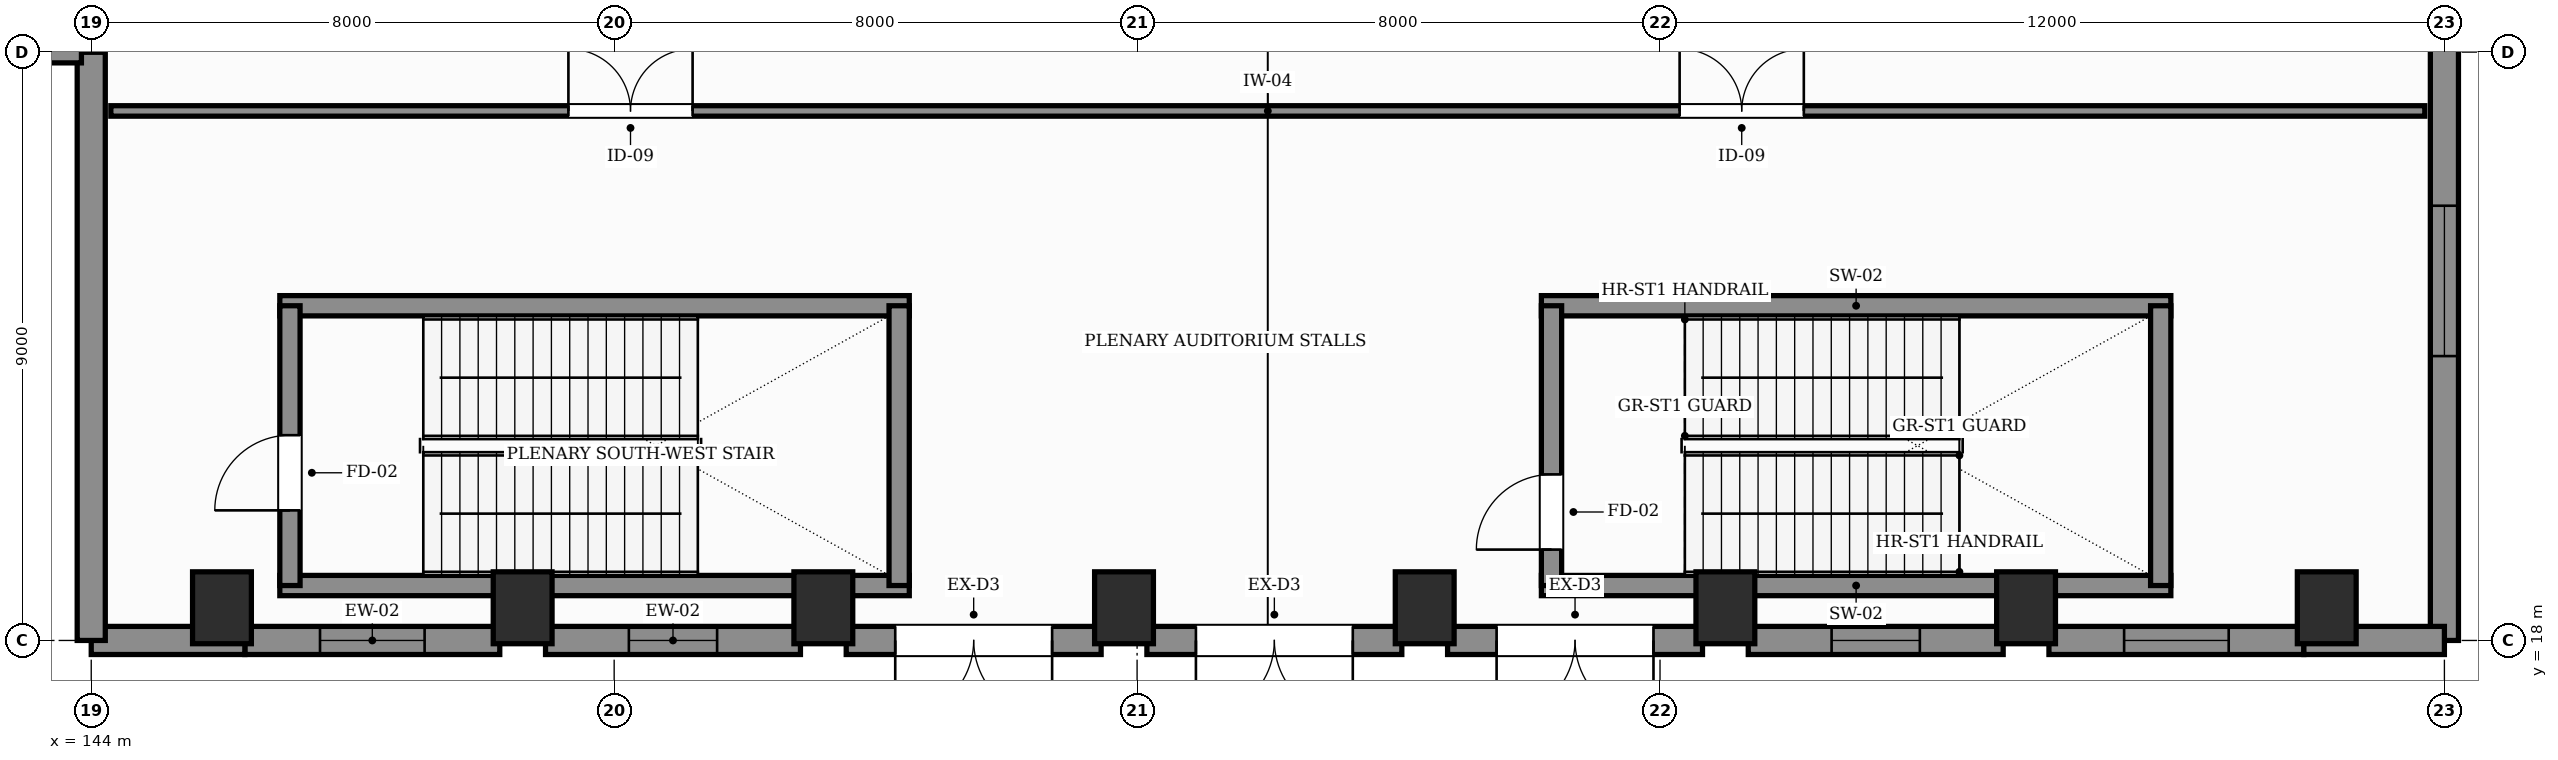
"""IFC4 building model, lengths in metres.
Left out: names, types, materials, properties, quantities, classifications, styles, units other than length and angle.
Written with IfcOpenShell. Run it as: python <this file> out.ifc"""

import sys

from ifc_helpers import new_model, si_unit, direction, frame, frame_2d, origin, origin_2d, place, context, subcontext, project, spatial, rectangle, extrude, element, fill, save


model = new_model("IFC4")
c1 = context("Model", 3, precision=1e-05, world=origin(), true_north=direction((0.0, 1.0)))
c2 = subcontext(c1, "Body", "Model", "MODEL_VIEW")
j1 = project(units=[si_unit("LENGTHUNIT", "METRE"), si_unit("PLANEANGLEUNIT", "RADIAN")], contexts=[c1])
p1 = place(None, origin())
s1 = spatial("IfcSite", under=j1, at=p1, CompositionType="ELEMENT")
p2 = place(p1, origin())
s2 = spatial("IfcBuilding", under=s1, at=p2, CompositionType="ELEMENT")
p3 = place(p2, origin())
s3 = spatial("IfcBuildingStorey", under=s2, at=p3, CompositionType="ELEMENT", Elevation=0.0)
for number, where, z_axis, x_axis in (
    (1, (146.0, 18.5, 0.0), (0.0, 0.0, 1.0), (1.0, 0.0, 0.0)),
    (2, (150.6, 18.5, 0.0), (0.0, 0.0, 1.0), (1.0, 0.0, 0.0)),
    (3, (155.2, 18.5, 0.0), (0.0, 0.0, 1.0), (1.0, 0.0, 0.0)),
    (4, (159.8, 18.5, 0.0), (0.0, 0.0, 1.0), (1.0, 0.0, 0.0)),
    (5, (164.4, 18.5, 0.0), (0.0, 0.0, 1.0), (1.0, 0.0, 0.0)),
    (6, (169.0, 18.5, 0.0), (0.0, 0.0, 1.0), (1.0, 0.0, 0.0)),
    (7, (173.6, 18.5, 0.0), (0.0, 0.0, 1.0), (1.0, 0.0, 0.0)),
    (8, (178.2, 18.5, 0.0), (0.0, 0.0, 1.0), (1.0, 0.0, 0.0)),
):
    element("IfcColumn", number, at=place(p3, frame(where, z_axis=z_axis, x_axis=x_axis)), inside=s3, PredefinedType="COLUMN", context=c2, shape_type="SweptSolid", body=[
        extrude(rectangle(XDim=0.9, YDim=1.1, at=origin_2d()), origin(), (0.0, 0.0, 1.0), 6.0),
    ])
p4 = place(p3, frame((146.35, 18.0, 0.0), z_axis=(0.0, 0.0, 1.0), x_axis=(1.0, 0.0, 0.0)))
e9 = element("IfcWall", 9, at=p4, inside=s3, PredefinedType="SOLIDWALL", context=c2, shape_type="SweptSolid", body=[
    extrude(rectangle(XDim=3.9, YDim=0.43, at=frame_2d((1.95, 0.0))), origin(), (0.0, 0.0, 1.0), 6.0),
])
p5 = place(p4, frame((1.15, 0.0, 0.9)))
e10 = element("IfcOpeningElement", 10, at=p5, cuts=e9, PredefinedType="OPENING", context=c2, shape_type="SweptSolid", body=[
    extrude(rectangle(XDim=1.6, YDim=2.6, at=frame_2d((0.8, 1.3))), frame((0.0, 0.225, 0.0), z_axis=(0.0, -1.0, 0.0), x_axis=(1.0, 0.0, 0.0)), (0.0, 0.0, 1.0), 0.45),
])
p6 = place(p3, frame((150.95, 18.0, 0.0), z_axis=(0.0, 0.0, 1.0), x_axis=(1.0, 0.0, 0.0)))
e11 = element("IfcWall", 11, at=p6, inside=s3, PredefinedType="SOLIDWALL", context=c2, shape_type="SweptSolid", body=[
    extrude(rectangle(XDim=3.9, YDim=0.43, at=frame_2d((1.95, 0.0))), origin(), (0.0, 0.0, 1.0), 6.0),
])
p7 = place(p6, frame((1.275, 0.0, 0.9)))
e12 = element("IfcOpeningElement", 12, at=p7, cuts=e11, PredefinedType="OPENING", context=c2, shape_type="SweptSolid", body=[
    extrude(rectangle(XDim=1.35, YDim=2.45, at=frame_2d((0.675, 1.225))), frame((0.0, 0.225, 0.0), z_axis=(0.0, -1.0, 0.0), x_axis=(1.0, 0.0, 0.0)), (0.0, 0.0, 1.0), 0.45),
])
p8 = place(p3, frame((155.55, 18.0, 0.0), z_axis=(0.0, 0.0, 1.0), x_axis=(1.0, 0.0, 0.0)))
e13 = element("IfcWall", 13, at=p8, inside=s3, PredefinedType="SOLIDWALL", context=c2, shape_type="SweptSolid", body=[
    extrude(rectangle(XDim=3.9, YDim=0.43, at=frame_2d((1.95, 0.0))), origin(), (0.0, 0.0, 1.0), 6.0),
])
p9 = place(p8, frame((0.75, 0.0, 0.0)))
e14 = element("IfcOpeningElement", 14, at=p9, cuts=e13, PredefinedType="OPENING", context=c2, shape_type="SweptSolid", body=[
    extrude(rectangle(XDim=2.4, YDim=2.5, at=frame_2d((1.2, 1.25))), frame((0.0, 0.225, 0.0), z_axis=(0.0, -1.0, 0.0), x_axis=(1.0, 0.0, 0.0)), (0.0, 0.0, 1.0), 0.45),
])
p10 = place(p3, frame((160.15, 18.0, 0.0), z_axis=(0.0, 0.0, 1.0), x_axis=(1.0, 0.0, 0.0)))
e15 = element("IfcWall", 15, at=p10, inside=s3, PredefinedType="SOLIDWALL", context=c2, shape_type="SweptSolid", body=[
    extrude(rectangle(XDim=3.9, YDim=0.43, at=frame_2d((1.95, 0.0))), origin(), (0.0, 0.0, 1.0), 6.0),
])
p11 = place(p10, frame((0.75, 0.0, 0.0)))
e16 = element("IfcOpeningElement", 16, at=p11, cuts=e15, PredefinedType="OPENING", context=c2, shape_type="SweptSolid", body=[
    extrude(rectangle(XDim=2.4, YDim=2.5, at=frame_2d((1.2, 1.25))), frame((0.0, 0.225, 0.0), z_axis=(0.0, -1.0, 0.0), x_axis=(1.0, 0.0, 0.0)), (0.0, 0.0, 1.0), 0.45),
])
p12 = place(p3, frame((164.75, 18.0, 0.0), z_axis=(0.0, 0.0, 1.0), x_axis=(1.0, 0.0, 0.0)))
e17 = element("IfcWall", 17, at=p12, inside=s3, PredefinedType="SOLIDWALL", context=c2, shape_type="SweptSolid", body=[
    extrude(rectangle(XDim=3.9, YDim=0.43, at=frame_2d((1.95, 0.0))), origin(), (0.0, 0.0, 1.0), 6.0),
])
p13 = place(p12, frame((0.75, 0.0, 0.0)))
e18 = element("IfcOpeningElement", 18, at=p13, cuts=e17, PredefinedType="OPENING", context=c2, shape_type="SweptSolid", body=[
    extrude(rectangle(XDim=2.4, YDim=2.5, at=frame_2d((1.2, 1.25))), frame((0.0, 0.225, 0.0), z_axis=(0.0, -1.0, 0.0), x_axis=(1.0, 0.0, 0.0)), (0.0, 0.0, 1.0), 0.45),
])
p14 = place(p3, frame((169.35, 18.0, 0.0), z_axis=(0.0, 0.0, 1.0), x_axis=(1.0, 0.0, 0.0)))
e19 = element("IfcWall", 19, at=p14, inside=s3, PredefinedType="SOLIDWALL", context=c2, shape_type="SweptSolid", body=[
    extrude(rectangle(XDim=3.9, YDim=0.43, at=frame_2d((1.95, 0.0))), origin(), (0.0, 0.0, 1.0), 6.0),
])
p15 = place(p14, frame((1.275, 0.0, 0.9)))
e20 = element("IfcOpeningElement", 20, at=p15, cuts=e19, PredefinedType="OPENING", context=c2, shape_type="SweptSolid", body=[
    extrude(rectangle(XDim=1.35, YDim=2.45, at=frame_2d((0.675, 1.225))), frame((0.0, 0.225, 0.0), z_axis=(0.0, -1.0, 0.0), x_axis=(1.0, 0.0, 0.0)), (0.0, 0.0, 1.0), 0.45),
])
p16 = place(p3, frame((173.95, 18.0, 0.0), z_axis=(0.0, 0.0, 1.0), x_axis=(1.0, 0.0, 0.0)))
e21 = element("IfcWall", 21, at=p16, inside=s3, PredefinedType="SOLIDWALL", context=c2, shape_type="SweptSolid", body=[
    extrude(rectangle(XDim=3.9, YDim=0.43, at=frame_2d((1.95, 0.0))), origin(), (0.0, 0.0, 1.0), 6.0),
])
p17 = place(p16, frame((1.15, 0.0, 0.9)))
e22 = element("IfcOpeningElement", 22, at=p17, cuts=e21, PredefinedType="OPENING", context=c2, shape_type="SweptSolid", body=[
    extrude(rectangle(XDim=1.6, YDim=2.6, at=frame_2d((0.8, 1.3))), frame((0.0, 0.225, 0.0), z_axis=(0.0, -1.0, 0.0), x_axis=(1.0, 0.0, 0.0)), (0.0, 0.0, 1.0), 0.45),
])
p18 = place(p3, frame((180.0, 18.0, 0.0), z_axis=(0.0, 0.0, 1.0), x_axis=(0.0, 1.0, 0.0)))
e23 = element("IfcWall", 23, at=p18, inside=s3, PredefinedType="SOLIDWALL", context=c2, shape_type="SweptSolid", body=[
    extrude(rectangle(XDim=11.0, YDim=0.43, at=frame_2d((5.5, 0.0))), origin(), (0.0, 0.0, 1.0), 6.0),
])
p19 = place(p18, frame((4.35, 0.0, 1.2)))
e24 = element("IfcOpeningElement", 24, at=p19, cuts=e23, PredefinedType="OPENING", context=c2, shape_type="SweptSolid", body=[
    extrude(rectangle(XDim=2.3, YDim=1.55, at=frame_2d((1.15, 0.775))), frame((0.0, 0.225, 0.0), z_axis=(0.0, -1.0, 0.0), x_axis=(1.0, 0.0, 0.0)), (0.0, 0.0, 1.0), 0.45),
])
p20 = place(p3, frame((144.0, 18.0, 0.0), z_axis=(0.0, 0.0, 1.0), x_axis=(1.0, 0.0, 0.0)))
e25 = element("IfcWall", 25, at=p20, inside=s3, PredefinedType="SOLIDWALL", context=c2, shape_type="SweptSolid", body=[
    extrude(rectangle(XDim=2.35, YDim=0.43, at=frame_2d((1.175, 0.0))), origin(), (0.0, 0.0, 1.0), 6.0),
])
p21 = place(p3, frame((177.85, 18.0, 0.0), z_axis=(0.0, 0.0, 1.0), x_axis=(1.0, 0.0, 0.0)))
e26 = element("IfcWall", 26, at=p21, inside=s3, PredefinedType="SOLIDWALL", context=c2, shape_type="SweptSolid", body=[
    extrude(rectangle(XDim=2.15, YDim=0.43, at=frame_2d((1.075, 0.0))), origin(), (0.0, 0.0, 1.0), 6.0),
])
p22 = place(p3, frame((144.0, 18.0, 0.0), z_axis=(0.0, 0.0, 1.0), x_axis=(0.0, 1.0, 0.0)))
e27 = element("IfcWall", 27, at=p22, inside=s3, PredefinedType="SOLIDWALL", context=c2, shape_type="SweptSolid", body=[
    extrude(rectangle(XDim=9.0, YDim=0.43, at=frame_2d((4.5, 0.0))), origin(), (0.0, 0.0, 1.0), 6.0),
])
p23 = place(p3, frame((136.0, 27.0, 0.0), z_axis=(0.0, 0.0, 1.0), x_axis=(1.0, 0.0, 0.0)))
e28 = element("IfcWall", 28, at=p23, inside=s3, PredefinedType="SOLIDWALL", context=c2, shape_type="SweptSolid", body=[
    extrude(rectangle(XDim=7.85, YDim=0.33, at=frame_2d((3.925, 0.0))), origin(), (0.0, 0.0, 1.0), 4.6),
])
p24 = place(p23, frame((2.55, 0.0, 0.9)))
e29 = element("IfcOpeningElement", 29, at=p24, cuts=e28, PredefinedType="OPENING", context=c2, shape_type="SweptSolid", body=[
    extrude(rectangle(XDim=2.75, YDim=2.15, at=frame_2d((1.375, 1.075))), frame((0.0, 0.175, 0.0), z_axis=(0.0, -1.0, 0.0), x_axis=(1.0, 0.0, 0.0)), (0.0, 0.0, 1.0), 0.35),
])
for number, where, z_axis, x_axis in (
    (30, (166.185, 18.84, 0.0), (0.0, 0.0, 1.0), (1.0, 0.0, 0.0)),
    (31, (166.185, 23.12, 0.0), (0.0, 0.0, 1.0), (1.0, 0.0, 0.0)),
):
    element("IfcWall", number, at=place(p3, frame(where, z_axis=z_axis, x_axis=x_axis)), inside=s3, PredefinedType="SHEAR", context=c2, shape_type="SweptSolid", body=[
        extrude(rectangle(XDim=9.63, YDim=0.31, at=frame_2d((4.815, 0.0))), origin(), (0.0, 0.0, 1.0), 6.0),
    ])
p25 = place(p3, frame((166.34, 18.84, 0.0), z_axis=(0.0, 0.0, 1.0), x_axis=(0.0, 1.0, 0.0)))
e32 = element("IfcWall", 32, at=p25, inside=s3, PredefinedType="SHEAR", context=c2, shape_type="SweptSolid", body=[
    extrude(rectangle(XDim=4.28, YDim=0.31, at=frame_2d((2.14, 0.0))), origin(), (0.0, 0.0, 1.0), 6.0),
])
p26 = place(p25, frame((0.55, 0.0, 0.0)))
e33 = element("IfcOpeningElement", 33, at=p26, cuts=e32, PredefinedType="OPENING", context=c2, shape_type="SweptSolid", body=[
    extrude(rectangle(XDim=1.15, YDim=2.2, at=frame_2d((0.575, 1.1))), frame((0.0, 0.165, 0.0), z_axis=(0.0, -1.0, 0.0), x_axis=(1.0, 0.0, 0.0)), (0.0, 0.0, 1.0), 0.33),
])
p27 = place(p3, frame((175.66, 18.84, 0.0), z_axis=(0.0, 0.0, 1.0), x_axis=(0.0, 1.0, 0.0)))
e34 = element("IfcWall", 34, at=p27, inside=s3, PredefinedType="SHEAR", context=c2, shape_type="SweptSolid", body=[
    extrude(rectangle(XDim=4.28, YDim=0.31, at=frame_2d((2.14, 0.0))), origin(), (0.0, 0.0, 1.0), 6.0),
])
for number, where, z_axis, x_axis in (
    (35, (146.885, 18.84, 0.0), (0.0, 0.0, 1.0), (1.0, 0.0, 0.0)),
    (36, (146.885, 23.12, 0.0), (0.0, 0.0, 1.0), (1.0, 0.0, 0.0)),
):
    element("IfcWall", number, at=place(p3, frame(where, z_axis=z_axis, x_axis=x_axis)), inside=s3, PredefinedType="SHEAR", context=c2, shape_type="SweptSolid", body=[
        extrude(rectangle(XDim=9.63, YDim=0.31, at=frame_2d((4.815, 0.0))), origin(), (0.0, 0.0, 1.0), 6.0),
    ])
p28 = place(p3, frame((147.04, 18.84, 0.0), z_axis=(0.0, 0.0, 1.0), x_axis=(0.0, 1.0, 0.0)))
e37 = element("IfcWall", 37, at=p28, inside=s3, PredefinedType="SHEAR", context=c2, shape_type="SweptSolid", body=[
    extrude(rectangle(XDim=4.28, YDim=0.31, at=frame_2d((2.14, 0.0))), origin(), (0.0, 0.0, 1.0), 6.0),
])
p29 = place(p28, frame((1.15, 0.0, 0.0)))
e38 = element("IfcOpeningElement", 38, at=p29, cuts=e37, PredefinedType="OPENING", context=c2, shape_type="SweptSolid", body=[
    extrude(rectangle(XDim=1.15, YDim=2.2, at=frame_2d((0.575, 1.1))), frame((0.0, 0.165, 0.0), z_axis=(0.0, -1.0, 0.0), x_axis=(1.0, 0.0, 0.0)), (0.0, 0.0, 1.0), 0.33),
])
p30 = place(p3, frame((156.36, 18.84, 0.0), z_axis=(0.0, 0.0, 1.0), x_axis=(0.0, 1.0, 0.0)))
e39 = element("IfcWall", 39, at=p30, inside=s3, PredefinedType="SHEAR", context=c2, shape_type="SweptSolid", body=[
    extrude(rectangle(XDim=4.28, YDim=0.31, at=frame_2d((2.14, 0.0))), origin(), (0.0, 0.0, 1.0), 6.0),
])
p31 = place(p3, frame((144.3, 26.1, 0.0), z_axis=(0.0, 0.0, 1.0), x_axis=(1.0, 0.0, 0.0)))
e40 = element("IfcWall", 40, at=p31, inside=s3, PredefinedType="PARTITIONING", context=c2, shape_type="SweptSolid", body=[
    extrude(rectangle(XDim=35.4, YDim=0.16, at=frame_2d((17.7, 0.0))), origin(), (0.0, 0.0, 1.0), 4.65),
])
p32 = place(p31, frame((7.0, 0.0, 0.0)))
e41 = element("IfcOpeningElement", 41, at=p32, cuts=e40, PredefinedType="OPENING", context=c2, shape_type="SweptSolid", body=[
    extrude(rectangle(XDim=1.9, YDim=2.4, at=frame_2d((0.95, 1.2))), frame((0.0, 0.09, 0.0), z_axis=(0.0, -1.0, 0.0), x_axis=(1.0, 0.0, 0.0)), (0.0, 0.0, 1.0), 0.18),
])
p33 = place(p31, frame((24.0, 0.0, 0.0)))
e42 = element("IfcOpeningElement", 42, at=p33, cuts=e40, PredefinedType="OPENING", context=c2, shape_type="SweptSolid", body=[
    extrude(rectangle(XDim=1.9, YDim=2.4, at=frame_2d((0.95, 1.2))), frame((0.0, 0.09, 0.0), z_axis=(0.0, -1.0, 0.0), x_axis=(1.0, 0.0, 0.0)), (0.0, 0.0, 1.0), 0.18),
])
p34 = place(p5, origin())
e43 = element("IfcWindow", 43, at=p34, inside=s3, PartitioningType="SINGLE_PANEL", PredefinedType="WINDOW", context=c2, shape_type="SweptSolid", body=[
    extrude(rectangle(XDim=1.6, YDim=2.6, at=frame_2d((0.8, 1.3))), frame((0.0, 0.03, 0.0), z_axis=(0.0, -1.0, 0.0), x_axis=(1.0, 0.0, 0.0)), (0.0, 0.0, 1.0), 0.06),
])
fill(e10, e43)
p35 = place(p7, origin())
e44 = element("IfcWindow", 44, at=p35, inside=s3, PartitioningType="SINGLE_PANEL", PredefinedType="WINDOW", context=c2, shape_type="SweptSolid", body=[
    extrude(rectangle(XDim=1.35, YDim=2.45, at=frame_2d((0.675, 1.225))), frame((0.0, 0.03, 0.0), z_axis=(0.0, -1.0, 0.0), x_axis=(1.0, 0.0, 0.0)), (0.0, 0.0, 1.0), 0.06),
])
fill(e12, e44)
p36 = place(p9, frame((2.4, 0.0, 0.0), z_axis=(0.0, 0.0, 1.0), x_axis=(-1.0, 0.0, 0.0)))
e45 = element("IfcDoor", 45, at=p36, inside=s3, OperationType="DOUBLE_DOOR_SINGLE_SWING", PredefinedType="DOOR", context=c2, shape_type="SweptSolid", body=[
    extrude(rectangle(XDim=2.4, YDim=2.5, at=frame_2d((1.2, 1.25))), frame((0.0, 0.025, 0.0), z_axis=(0.0, -1.0, 0.0), x_axis=(1.0, 0.0, 0.0)), (0.0, 0.0, 1.0), 0.05),
])
fill(e14, e45)
p37 = place(p11, frame((2.4, 0.0, 0.0), z_axis=(0.0, 0.0, 1.0), x_axis=(-1.0, 0.0, 0.0)))
e46 = element("IfcDoor", 46, at=p37, inside=s3, OperationType="DOUBLE_DOOR_SINGLE_SWING", PredefinedType="DOOR", context=c2, shape_type="SweptSolid", body=[
    extrude(rectangle(XDim=2.4, YDim=2.5, at=frame_2d((1.2, 1.25))), frame((0.0, 0.025, 0.0), z_axis=(0.0, -1.0, 0.0), x_axis=(1.0, 0.0, 0.0)), (0.0, 0.0, 1.0), 0.05),
])
fill(e16, e46)
p38 = place(p13, frame((2.4, 0.0, 0.0), z_axis=(0.0, 0.0, 1.0), x_axis=(-1.0, 0.0, 0.0)))
e47 = element("IfcDoor", 47, at=p38, inside=s3, OperationType="DOUBLE_DOOR_SINGLE_SWING", PredefinedType="DOOR", context=c2, shape_type="SweptSolid", body=[
    extrude(rectangle(XDim=2.4, YDim=2.5, at=frame_2d((1.2, 1.25))), frame((0.0, 0.025, 0.0), z_axis=(0.0, -1.0, 0.0), x_axis=(1.0, 0.0, 0.0)), (0.0, 0.0, 1.0), 0.05),
])
fill(e18, e47)
p39 = place(p15, origin())
e48 = element("IfcWindow", 48, at=p39, inside=s3, PartitioningType="SINGLE_PANEL", PredefinedType="WINDOW", context=c2, shape_type="SweptSolid", body=[
    extrude(rectangle(XDim=1.35, YDim=2.45, at=frame_2d((0.675, 1.225))), frame((0.0, 0.03, 0.0), z_axis=(0.0, -1.0, 0.0), x_axis=(1.0, 0.0, 0.0)), (0.0, 0.0, 1.0), 0.06),
])
fill(e20, e48)
p40 = place(p17, origin())
e49 = element("IfcWindow", 49, at=p40, inside=s3, PartitioningType="SINGLE_PANEL", PredefinedType="WINDOW", context=c2, shape_type="SweptSolid", body=[
    extrude(rectangle(XDim=1.6, YDim=2.6, at=frame_2d((0.8, 1.3))), frame((0.0, 0.03, 0.0), z_axis=(0.0, -1.0, 0.0), x_axis=(1.0, 0.0, 0.0)), (0.0, 0.0, 1.0), 0.06),
])
fill(e22, e49)
p41 = place(p19, origin())
e50 = element("IfcWindow", 50, at=p41, inside=s3, PartitioningType="SINGLE_PANEL", PredefinedType="WINDOW", context=c2, shape_type="SweptSolid", body=[
    extrude(rectangle(XDim=2.3, YDim=1.55, at=frame_2d((1.15, 0.775))), frame((0.0, 0.03, 0.0), z_axis=(0.0, -1.0, 0.0), x_axis=(1.0, 0.0, 0.0)), (0.0, 0.0, 1.0), 0.06),
])
fill(e24, e50)
p42 = place(p26, origin())
e51 = element("IfcDoor", 51, at=p42, inside=s3, OperationType="SINGLE_SWING_LEFT", PredefinedType="DOOR", context=c2, shape_type="SweptSolid", body=[
    extrude(rectangle(XDim=1.15, YDim=2.2, at=frame_2d((0.575, 1.1))), frame((0.0, 0.025, 0.0), z_axis=(0.0, -1.0, 0.0), x_axis=(1.0, 0.0, 0.0)), (0.0, 0.0, 1.0), 0.05),
])
fill(e33, e51)
p43 = place(p29, origin())
e52 = element("IfcDoor", 52, at=p43, inside=s3, OperationType="SINGLE_SWING_LEFT", PredefinedType="DOOR", context=c2, shape_type="SweptSolid", body=[
    extrude(rectangle(XDim=1.15, YDim=2.2, at=frame_2d((0.575, 1.1))), frame((0.0, 0.025, 0.0), z_axis=(0.0, -1.0, 0.0), x_axis=(1.0, 0.0, 0.0)), (0.0, 0.0, 1.0), 0.05),
])
fill(e38, e52)
p44 = place(p32, origin())
e53 = element("IfcDoor", 53, at=p44, inside=s3, OperationType="DOUBLE_DOOR_SINGLE_SWING", PredefinedType="DOOR", context=c2, shape_type="SweptSolid", body=[
    extrude(rectangle(XDim=1.9, YDim=2.4, at=frame_2d((0.95, 1.2))), frame((0.0, 0.025, 0.0), z_axis=(0.0, -1.0, 0.0), x_axis=(1.0, 0.0, 0.0)), (0.0, 0.0, 1.0), 0.05),
])
fill(e41, e53)
p45 = place(p33, origin())
e54 = element("IfcDoor", 54, at=p45, inside=s3, OperationType="DOUBLE_DOOR_SINGLE_SWING", PredefinedType="DOOR", context=c2, shape_type="SweptSolid", body=[
    extrude(rectangle(XDim=1.9, YDim=2.4, at=frame_2d((0.95, 1.2))), frame((0.0, 0.025, 0.0), z_axis=(0.0, -1.0, 0.0), x_axis=(1.0, 0.0, 0.0)), (0.0, 0.0, 1.0), 0.05),
])
fill(e42, e54)
save(model, sys.argv[1])
